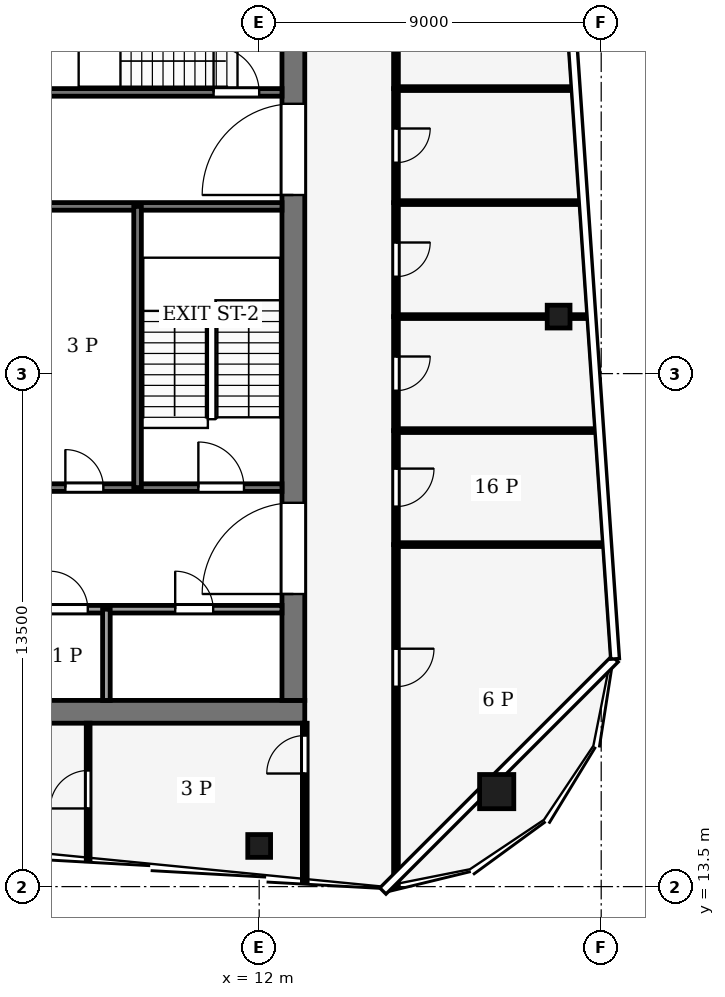
"""IFC4 building model, lengths in metres.
Left out: names, types, materials, properties, quantities, classifications, styles, units other than length and angle.
Written with IfcOpenShell. Run it as: python <this file> out.ifc"""

import sys

from ifc_helpers import new_model, si_unit, direction, frame, frame_2d, origin, origin_2d, place, context, subcontext, project, spatial, rectangle, hollow_rectangle, extrude, element, fill, save


model = new_model("IFC4")
c1 = context("Model", 3, precision=1e-05, world=origin(), true_north=direction((0.0, 1.0)))
c2 = subcontext(c1, "Body", "Model", "MODEL_VIEW")
j1 = project(units=[si_unit("LENGTHUNIT", "METRE"), si_unit("PLANEANGLEUNIT", "RADIAN")], contexts=[c1])
p1 = place(None, origin())
s1 = spatial("IfcSite", under=j1, at=p1, CompositionType="ELEMENT")
p2 = place(p1, origin())
s2 = spatial("IfcBuilding", under=s1, at=p2, CompositionType="ELEMENT")
p3 = place(p2, frame((0.0, 0.0, 314.0)))
s3 = spatial("IfcBuildingStorey", under=s2, at=p3, CompositionType="ELEMENT", Elevation=314.0)
p4 = place(p3, frame((-13.2, 18.1, -0.13), z_axis=(0.0, 0.0, 1.0), x_axis=(1.0, 0.0, 0.0)))
e1 = element("IfcWall", 1, at=p4, inside=s3, PredefinedType="SHEAR", context=c2, shape_type="SweptSolid", body=[
    extrude(rectangle(XDim=26.4, YDim=0.6, at=frame_2d((13.2, 0.0))), origin(), (0.0, 0.0, 1.0), 4.0),
])
p5 = place(p3, frame((12.9, 18.4, -0.13), z_axis=(0.0, 0.0, 1.0), x_axis=(0.0, 1.0, 0.0)))
e2 = element("IfcWall", 2, at=p5, inside=s3, PredefinedType="SHEAR", context=c2, shape_type="SweptSolid", body=[
    extrude(rectangle(XDim=19.2, YDim=0.6, at=frame_2d((9.6, 0.0))), origin(), (0.0, 0.0, 1.0), 4.0),
])
p6 = place(p5, frame((2.8, 0.0, 0.13)))
e3 = element("IfcOpeningElement", 3, at=p6, cuts=e2, PredefinedType="OPENING", context=c2, shape_type="SweptSolid", body=[
    extrude(rectangle(XDim=2.4, YDim=2.4, at=frame_2d((1.2, 1.2))), frame((0.0, 0.31, 0.0), z_axis=(0.0, -1.0, 0.0), x_axis=(1.0, 0.0, 0.0)), (0.0, 0.0, 1.0), 0.62),
])
p7 = place(p5, frame((13.3, 0.0, 0.13)))
e4 = element("IfcOpeningElement", 4, at=p7, cuts=e2, PredefinedType="OPENING", context=c2, shape_type="SweptSolid", body=[
    extrude(rectangle(XDim=2.4, YDim=2.4, at=frame_2d((1.2, 1.2))), frame((0.0, 0.31, 0.0), z_axis=(0.0, -1.0, 0.0), x_axis=(1.0, 0.0, 0.0)), (0.0, 0.0, 1.0), 0.62),
])
p8 = place(p3, frame((18.25, 16.0, 0.0), z_axis=(0.0, 0.0, 1.0), x_axis=(1.0, 0.0, 0.0)))
e5 = element("IfcColumn", 5, at=p8, inside=s3, PredefinedType="COLUMN", context=c2, shape_type="SweptSolid", body=[
    extrude(hollow_rectangle(XDim=0.9, YDim=0.9, WallThickness=0.04, at=origin_2d()), origin(), (0.0, 0.0, 1.0), 4.0),
])
for number, where, z_axis, x_axis in (
    (6, (12.0, 14.57, 0.0), (0.0, 0.0, 1.0), (1.0, 0.0, 0.0)),
    (7, (19.879, 28.5, 0.0), (0.0, 0.0, 1.0), (1.0, 0.0, 0.0)),
):
    element("IfcColumn", number, at=place(p3, frame(where, z_axis=z_axis, x_axis=x_axis)), inside=s3, PredefinedType="COLUMN", context=c2, shape_type="SweptSolid", body=[
        extrude(hollow_rectangle(XDim=0.6, YDim=0.6, WallThickness=0.025, at=origin_2d()), origin(), (0.0, 0.0, 1.0), 4.0),
    ])
p9 = place(p3, frame((6.0, 20.8, 0.0), z_axis=(0.0, 0.0, 1.0), x_axis=(1.0, 0.0, 0.0)))
e8 = element("IfcWall", 8, at=p9, inside=s3, PredefinedType="PARTITIONING", context=c2, shape_type="SweptSolid", body=[
    extrude(rectangle(XDim=6.6, YDim=0.2, at=frame_2d((3.3, 0.0))), origin(), (0.0, 0.0, 1.0), 3.87),
])
p10 = place(p9, frame((0.49, 0.0, 0.0)))
e9 = element("IfcOpeningElement", 9, at=p10, cuts=e8, PredefinedType="OPENING", context=c2, shape_type="SweptSolid", body=[
    extrude(rectangle(XDim=1.0, YDim=2.1, at=frame_2d((0.5, 1.05))), frame((0.0, 0.11, 0.0), z_axis=(0.0, -1.0, 0.0), x_axis=(1.0, 0.0, 0.0)), (0.0, 0.0, 1.0), 0.22),
])
p11 = place(p9, frame((3.79, 0.0, 0.0)))
e10 = element("IfcOpeningElement", 10, at=p11, cuts=e8, PredefinedType="OPENING", context=c2, shape_type="SweptSolid", body=[
    extrude(rectangle(XDim=1.0, YDim=2.1, at=frame_2d((0.5, 1.05))), frame((0.0, 0.11, 0.0), z_axis=(0.0, -1.0, 0.0), x_axis=(1.0, 0.0, 0.0)), (0.0, 0.0, 1.0), 0.22),
])
p12 = place(p3, frame((6.0, 24.0, 0.0), z_axis=(0.0, 0.0, 1.0), x_axis=(1.0, 0.0, 0.0)))
e11 = element("IfcWall", 11, at=p12, inside=s3, PredefinedType="PARTITIONING", context=c2, shape_type="SweptSolid", body=[
    extrude(rectangle(XDim=6.6, YDim=0.2, at=frame_2d((3.3, 0.0))), origin(), (0.0, 0.0, 1.0), 3.87),
])
p13 = place(p12, frame((0.9, 0.0, 0.0)))
e12 = element("IfcOpeningElement", 12, at=p13, cuts=e11, PredefinedType="OPENING", context=c2, shape_type="SweptSolid", body=[
    extrude(rectangle(XDim=1.0, YDim=2.1, at=frame_2d((0.5, 1.05))), frame((0.0, 0.11, 0.0), z_axis=(0.0, -1.0, 0.0), x_axis=(1.0, 0.0, 0.0)), (0.0, 0.0, 1.0), 0.22),
])
p14 = place(p12, frame((4.4, 0.0, 0.0)))
e13 = element("IfcOpeningElement", 13, at=p14, cuts=e11, PredefinedType="OPENING", context=c2, shape_type="SweptSolid", body=[
    extrude(rectangle(XDim=1.2, YDim=2.2, at=frame_2d((0.6, 1.1))), frame((0.0, 0.11, 0.0), z_axis=(0.0, -1.0, 0.0), x_axis=(1.0, 0.0, 0.0)), (0.0, 0.0, 1.0), 0.22),
])
p15 = place(p3, frame((6.0, 31.4, 0.0), z_axis=(0.0, 0.0, 1.0), x_axis=(1.0, 0.0, 0.0)))
e14 = element("IfcWall", 14, at=p15, inside=s3, PredefinedType="PARTITIONING", context=c2, shape_type="SweptSolid", body=[
    extrude(rectangle(XDim=6.6, YDim=0.2, at=frame_2d((3.3, 0.0))), origin(), (0.0, 0.0, 1.0), 3.87),
])
p16 = place(p3, frame((6.0, 34.4, 0.0), z_axis=(0.0, 0.0, 1.0), x_axis=(1.0, 0.0, 0.0)))
e15 = element("IfcWall", 15, at=p16, inside=s3, PredefinedType="PARTITIONING", context=c2, shape_type="SweptSolid", body=[
    extrude(rectangle(XDim=6.6, YDim=0.2, at=frame_2d((3.3, 0.0))), origin(), (0.0, 0.0, 1.0), 3.87),
])
p17 = place(p16, frame((4.8, 0.0, 0.0)))
e16 = element("IfcOpeningElement", 16, at=p17, cuts=e15, PredefinedType="OPENING", context=c2, shape_type="SweptSolid", body=[
    extrude(rectangle(XDim=1.2, YDim=2.2, at=frame_2d((0.6, 1.1))), frame((0.0, 0.11, 0.0), z_axis=(0.0, -1.0, 0.0), x_axis=(1.0, 0.0, 0.0)), (0.0, 0.0, 1.0), 0.22),
])
p18 = place(p3, frame((7.98, 18.4, 0.0), z_axis=(0.0, 0.0, 1.0), x_axis=(0.0, 1.0, 0.0)))
e17 = element("IfcWall", 17, at=p18, inside=s3, PredefinedType="PARTITIONING", context=c2, shape_type="SweptSolid", body=[
    extrude(rectangle(XDim=2.4, YDim=0.2, at=frame_2d((1.2, 0.0))), origin(), (0.0, 0.0, 1.0), 3.87),
])
p19 = place(p3, frame((8.8, 24.0, 0.0), z_axis=(0.0, 0.0, 1.0), x_axis=(0.0, 1.0, 0.0)))
e18 = element("IfcWall", 18, at=p19, inside=s3, PredefinedType="PARTITIONING", context=c2, shape_type="SweptSolid", body=[
    extrude(rectangle(XDim=7.4, YDim=0.2, at=frame_2d((3.7, 0.0))), origin(), (0.0, 0.0, 1.0), 3.87),
])
p20 = place(p3, frame((15.6, 22.5, 0.0), z_axis=(0.0, 0.0, 1.0), x_axis=(0.0, -1.0, 0.0)))
e19 = element("IfcWall", 19, at=p20, inside=s3, PredefinedType="PARTITIONING", context=c2, shape_type="SweptSolid", body=[
    extrude(rectangle(XDim=9.01, YDim=0.125, at=frame_2d((4.505, 0.0))), origin(), (0.0, 0.0, 1.0), 2.93),
])
p21 = place(p20, frame((2.74, 0.0, 0.0)))
e20 = element("IfcOpeningElement", 20, at=p21, cuts=e19, PredefinedType="OPENING", context=c2, shape_type="SweptSolid", body=[
    extrude(rectangle(XDim=1.0, YDim=2.1, at=frame_2d((0.5, 1.05))), frame((0.0, 0.073, 0.0), z_axis=(0.0, -1.0, 0.0), x_axis=(1.0, 0.0, 0.0)), (0.0, 0.0, 1.0), 0.145),
])
p22 = place(p3, frame((15.6, 25.5, 0.0), z_axis=(0.0, 0.0, 1.0), x_axis=(0.0, -1.0, 0.0)))
e21 = element("IfcWall", 21, at=p22, inside=s3, PredefinedType="PARTITIONING", context=c2, shape_type="SweptSolid", body=[
    extrude(rectangle(XDim=3.0, YDim=0.125, at=frame_2d((1.5, 0.0))), origin(), (0.0, 0.0, 1.0), 3.54),
])
p23 = place(p22, frame((1.0, 0.0, 0.0)))
e22 = element("IfcOpeningElement", 22, at=p23, cuts=e21, PredefinedType="OPENING", context=c2, shape_type="SweptSolid", body=[
    extrude(rectangle(XDim=1.0, YDim=2.1, at=frame_2d((0.5, 1.05))), frame((0.0, 0.073, 0.0), z_axis=(0.0, -1.0, 0.0), x_axis=(1.0, 0.0, 0.0)), (0.0, 0.0, 1.0), 0.145),
])
p24 = place(p3, frame((15.6, 28.5, 0.0), z_axis=(0.0, 0.0, 1.0), x_axis=(0.0, -1.0, 0.0)))
e23 = element("IfcWall", 23, at=p24, inside=s3, PredefinedType="PARTITIONING", context=c2, shape_type="SweptSolid", body=[
    extrude(rectangle(XDim=3.0, YDim=0.125, at=frame_2d((1.5, 0.0))), origin(), (0.0, 0.0, 1.0), 3.87),
])
p25 = place(p24, frame((1.05, 0.0, 0.0)))
e24 = element("IfcOpeningElement", 24, at=p25, cuts=e23, PredefinedType="OPENING", context=c2, shape_type="SweptSolid", body=[
    extrude(rectangle(XDim=0.9, YDim=2.1, at=frame_2d((0.45, 1.05))), frame((0.0, 0.073, 0.0), z_axis=(0.0, -1.0, 0.0), x_axis=(1.0, 0.0, 0.0)), (0.0, 0.0, 1.0), 0.145),
])
p26 = place(p3, frame((15.6, 31.5, 0.0), z_axis=(0.0, 0.0, 1.0), x_axis=(0.0, -1.0, 0.0)))
e25 = element("IfcWall", 25, at=p26, inside=s3, PredefinedType="PARTITIONING", context=c2, shape_type="SweptSolid", body=[
    extrude(rectangle(XDim=3.0, YDim=0.125, at=frame_2d((1.5, 0.0))), origin(), (0.0, 0.0, 1.0), 3.87),
])
p27 = place(p26, frame((1.05, 0.0, 0.0)))
e26 = element("IfcOpeningElement", 26, at=p27, cuts=e25, PredefinedType="OPENING", context=c2, shape_type="SweptSolid", body=[
    extrude(rectangle(XDim=0.9, YDim=2.1, at=frame_2d((0.45, 1.05))), frame((0.0, 0.073, 0.0), z_axis=(0.0, -1.0, 0.0), x_axis=(1.0, 0.0, 0.0)), (0.0, 0.0, 1.0), 0.145),
])
p28 = place(p3, frame((15.6, 34.5, 0.0), z_axis=(0.0, 0.0, 1.0), x_axis=(0.0, -1.0, 0.0)))
e27 = element("IfcWall", 27, at=p28, inside=s3, PredefinedType="PARTITIONING", context=c2, shape_type="SweptSolid", body=[
    extrude(rectangle(XDim=3.0, YDim=0.125, at=frame_2d((1.5, 0.0))), origin(), (0.0, 0.0, 1.0), 3.54),
])
p29 = place(p28, frame((1.05, 0.0, 0.0)))
e28 = element("IfcOpeningElement", 28, at=p29, cuts=e27, PredefinedType="OPENING", context=c2, shape_type="SweptSolid", body=[
    extrude(rectangle(XDim=0.9, YDim=2.1, at=frame_2d((0.45, 1.05))), frame((0.0, 0.073, 0.0), z_axis=(0.0, -1.0, 0.0), x_axis=(1.0, 0.0, 0.0)), (0.0, 0.0, 1.0), 0.145),
])
p30 = place(p3, frame((15.6, 40.604, 0.0), z_axis=(0.0, 0.0, 1.0), x_axis=(0.0, -1.0, 0.0)))
e29 = element("IfcWall", 29, at=p30, inside=s3, PredefinedType="PARTITIONING", context=c2, shape_type="SweptSolid", body=[
    extrude(rectangle(XDim=6.104, YDim=0.125, at=frame_2d((3.052, 0.0))), origin(), (0.0, 0.0, 1.0), 3.14),
])
p31 = place(p30, frame((2.552, 0.0, 0.0)))
e30 = element("IfcOpeningElement", 30, at=p31, cuts=e29, PredefinedType="OPENING", context=c2, shape_type="SweptSolid", body=[
    extrude(rectangle(XDim=1.0, YDim=2.1, at=frame_2d((0.5, 1.05))), frame((0.0, 0.073, 0.0), z_axis=(0.0, -1.0, 0.0), x_axis=(1.0, 0.0, 0.0)), (0.0, 0.0, 1.0), 0.145),
])
p32 = place(p3, frame((13.2, 13.622, 0.0), z_axis=(0.0, 0.0, 1.0), x_axis=(0.0, 1.0, 0.0)))
e31 = element("IfcWall", 31, at=p32, inside=s3, PredefinedType="PARTITIONING", context=c2, shape_type="SweptSolid", body=[
    extrude(rectangle(XDim=4.178, YDim=0.125, at=frame_2d((2.089, 0.0))), origin(), (0.0, 0.0, 1.0), 3.04),
])
p33 = place(p32, frame((2.854, 0.0, 0.0)))
e32 = element("IfcOpeningElement", 32, at=p33, cuts=e31, PredefinedType="OPENING", context=c2, shape_type="SweptSolid", body=[
    extrude(rectangle(XDim=1.0, YDim=2.1, at=frame_2d((0.5, 1.05))), frame((0.0, 0.073, 0.0), z_axis=(0.0, -1.0, 0.0), x_axis=(1.0, 0.0, 0.0)), (0.0, 0.0, 1.0), 0.145),
])
p34 = place(p3, frame((21.123, 22.5, 0.0), z_axis=(0.0, 0.0, 1.0), x_axis=(-1.0, 0.0, 0.0)))
e33 = element("IfcWall", 33, at=p34, inside=s3, PredefinedType="PARTITIONING", context=c2, shape_type="SweptSolid", body=[
    extrude(rectangle(XDim=5.523, YDim=0.1, at=frame_2d((2.761, 0.0))), origin(), (0.0, 0.0, 1.0), 3.04),
])
p35 = place(p3, frame((20.916, 25.5, 0.0), z_axis=(0.0, 0.0, 1.0), x_axis=(-1.0, 0.0, 0.0)))
e34 = element("IfcWall", 34, at=p35, inside=s3, PredefinedType="PARTITIONING", context=c2, shape_type="SweptSolid", body=[
    extrude(rectangle(XDim=5.316, YDim=0.1, at=frame_2d((2.658, 0.0))), origin(), (0.0, 0.0, 1.0), 3.04),
])
p36 = place(p3, frame((20.709, 28.5, 0.0), z_axis=(0.0, 0.0, 1.0), x_axis=(-1.0, 0.0, 0.0)))
e35 = element("IfcWall", 35, at=p36, inside=s3, PredefinedType="PARTITIONING", context=c2, shape_type="SweptSolid", body=[
    extrude(rectangle(XDim=5.109, YDim=0.1, at=frame_2d((2.555, 0.0))), origin(), (0.0, 0.0, 1.0), 3.04),
])
p37 = place(p3, frame((20.502, 31.5, 0.0), z_axis=(0.0, 0.0, 1.0), x_axis=(-1.0, 0.0, 0.0)))
e36 = element("IfcWall", 36, at=p37, inside=s3, PredefinedType="PARTITIONING", context=c2, shape_type="SweptSolid", body=[
    extrude(rectangle(XDim=4.902, YDim=0.1, at=frame_2d((2.451, 0.0))), origin(), (0.0, 0.0, 1.0), 3.04),
])
p38 = place(p3, frame((20.295, 34.5, 0.0), z_axis=(0.0, 0.0, 1.0), x_axis=(-1.0, 0.0, 0.0)))
e37 = element("IfcWall", 37, at=p38, inside=s3, PredefinedType="PARTITIONING", context=c2, shape_type="SweptSolid", body=[
    extrude(rectangle(XDim=4.695, YDim=0.1, at=frame_2d((2.348, 0.0))), origin(), (0.0, 0.0, 1.0), 3.04),
])
p39 = place(p3, frame((7.5, 14.182, 0.0), z_axis=(0.0, 0.0, 1.0), x_axis=(0.0, 1.0, 0.0)))
e38 = element("IfcWall", 38, at=p39, inside=s3, PredefinedType="PARTITIONING", context=c2, shape_type="SweptSolid", body=[
    extrude(rectangle(XDim=3.618, YDim=0.1, at=frame_2d((1.809, 0.0))), origin(), (0.0, 0.0, 1.0), 3.04),
])
p40 = place(p39, frame((1.374, 0.0, 0.0)))
e39 = element("IfcOpeningElement", 39, at=p40, cuts=e38, PredefinedType="OPENING", context=c2, shape_type="SweptSolid", body=[
    extrude(rectangle(XDim=1.0, YDim=2.1, at=frame_2d((0.5, 1.05))), frame((0.0, 0.06, 0.0), z_axis=(0.0, -1.0, 0.0), x_axis=(1.0, 0.0, 0.0)), (0.0, 0.0, 1.0), 0.12),
])
p41 = place(p10, origin())
e40 = element("IfcDoor", 40, at=p41, inside=s3, OperationType="SINGLE_SWING_RIGHT", PredefinedType="DOOR", context=c2, shape_type="SweptSolid", body=[
    extrude(rectangle(XDim=1.0, YDim=2.1, at=frame_2d((0.5, 1.05))), frame((0.0, 0.025, 0.0), z_axis=(0.0, -1.0, 0.0), x_axis=(1.0, 0.0, 0.0)), (0.0, 0.0, 1.0), 0.05),
])
fill(e9, e40)
p42 = place(p11, origin())
e41 = element("IfcDoor", 41, at=p42, inside=s3, OperationType="SINGLE_SWING_RIGHT", PredefinedType="DOOR", context=c2, shape_type="SweptSolid", body=[
    extrude(rectangle(XDim=1.0, YDim=2.1, at=frame_2d((0.5, 1.05))), frame((0.0, 0.025, 0.0), z_axis=(0.0, -1.0, 0.0), x_axis=(1.0, 0.0, 0.0)), (0.0, 0.0, 1.0), 0.05),
])
fill(e10, e41)
p43 = place(p13, origin())
e42 = element("IfcDoor", 42, at=p43, inside=s3, OperationType="SINGLE_SWING_RIGHT", PredefinedType="DOOR", context=c2, shape_type="SweptSolid", body=[
    extrude(rectangle(XDim=1.0, YDim=2.1, at=frame_2d((0.5, 1.05))), frame((0.0, 0.025, 0.0), z_axis=(0.0, -1.0, 0.0), x_axis=(1.0, 0.0, 0.0)), (0.0, 0.0, 1.0), 0.05),
])
fill(e12, e42)
p44 = place(p14, origin())
e43 = element("IfcDoor", 43, at=p44, inside=s3, OperationType="SINGLE_SWING_LEFT", PredefinedType="DOOR", context=c2, shape_type="SweptSolid", body=[
    extrude(rectangle(XDim=1.2, YDim=2.2, at=frame_2d((0.6, 1.1))), frame((0.0, 0.025, 0.0), z_axis=(0.0, -1.0, 0.0), x_axis=(1.0, 0.0, 0.0)), (0.0, 0.0, 1.0), 0.05),
])
fill(e13, e43)
p45 = place(p17, origin())
e44 = element("IfcDoor", 44, at=p45, inside=s3, OperationType="SINGLE_SWING_RIGHT", PredefinedType="DOOR", context=c2, shape_type="SweptSolid", body=[
    extrude(rectangle(XDim=1.2, YDim=2.2, at=frame_2d((0.6, 1.1))), frame((0.0, 0.025, 0.0), z_axis=(0.0, -1.0, 0.0), x_axis=(1.0, 0.0, 0.0)), (0.0, 0.0, 1.0), 0.05),
])
fill(e16, e44)
p46 = place(p6, origin())
e45 = element("IfcDoor", 45, at=p46, inside=s3, OperationType="DOUBLE_DOOR_SINGLE_SWING", PredefinedType="DOOR", context=c2, shape_type="SweptSolid", body=[
    extrude(rectangle(XDim=2.4, YDim=2.4, at=frame_2d((1.2, 1.2))), frame((0.0, 0.025, 0.0), z_axis=(0.0, -1.0, 0.0), x_axis=(1.0, 0.0, 0.0)), (0.0, 0.0, 1.0), 0.05),
])
fill(e3, e45)
p47 = place(p7, origin())
e46 = element("IfcDoor", 46, at=p47, inside=s3, OperationType="DOUBLE_DOOR_SINGLE_SWING", PredefinedType="DOOR", context=c2, shape_type="SweptSolid", body=[
    extrude(rectangle(XDim=2.4, YDim=2.4, at=frame_2d((1.2, 1.2))), frame((0.0, 0.025, 0.0), z_axis=(0.0, -1.0, 0.0), x_axis=(1.0, 0.0, 0.0)), (0.0, 0.0, 1.0), 0.05),
])
fill(e4, e46)
p48 = place(p21, origin())
e47 = element("IfcDoor", 47, at=p48, inside=s3, OperationType="SINGLE_SWING_LEFT", PredefinedType="DOOR", context=c2, shape_type="SweptSolid", body=[
    extrude(rectangle(XDim=1.0, YDim=2.1, at=frame_2d((0.5, 1.05))), frame((0.0, 0.025, 0.0), z_axis=(0.0, -1.0, 0.0), x_axis=(1.0, 0.0, 0.0)), (0.0, 0.0, 1.0), 0.05),
])
fill(e20, e47)
p49 = place(p23, origin())
e48 = element("IfcDoor", 48, at=p49, inside=s3, OperationType="SINGLE_SWING_LEFT", PredefinedType="DOOR", context=c2, shape_type="SweptSolid", body=[
    extrude(rectangle(XDim=1.0, YDim=2.1, at=frame_2d((0.5, 1.05))), frame((0.0, 0.025, 0.0), z_axis=(0.0, -1.0, 0.0), x_axis=(1.0, 0.0, 0.0)), (0.0, 0.0, 1.0), 0.05),
])
fill(e22, e48)
p50 = place(p25, origin())
e49 = element("IfcDoor", 49, at=p50, inside=s3, OperationType="SINGLE_SWING_RIGHT", PredefinedType="DOOR", context=c2, shape_type="SweptSolid", body=[
    extrude(rectangle(XDim=0.9, YDim=2.1, at=frame_2d((0.45, 1.05))), frame((0.0, 0.025, 0.0), z_axis=(0.0, -1.0, 0.0), x_axis=(1.0, 0.0, 0.0)), (0.0, 0.0, 1.0), 0.05),
])
fill(e24, e49)
p51 = place(p27, origin())
e50 = element("IfcDoor", 50, at=p51, inside=s3, OperationType="SINGLE_SWING_LEFT", PredefinedType="DOOR", context=c2, shape_type="SweptSolid", body=[
    extrude(rectangle(XDim=0.9, YDim=2.1, at=frame_2d((0.45, 1.05))), frame((0.0, 0.025, 0.0), z_axis=(0.0, -1.0, 0.0), x_axis=(1.0, 0.0, 0.0)), (0.0, 0.0, 1.0), 0.05),
])
fill(e26, e50)
p52 = place(p29, origin())
e51 = element("IfcDoor", 51, at=p52, inside=s3, OperationType="SINGLE_SWING_RIGHT", PredefinedType="DOOR", context=c2, shape_type="SweptSolid", body=[
    extrude(rectangle(XDim=0.9, YDim=2.1, at=frame_2d((0.45, 1.05))), frame((0.0, 0.025, 0.0), z_axis=(0.0, -1.0, 0.0), x_axis=(1.0, 0.0, 0.0)), (0.0, 0.0, 1.0), 0.05),
])
fill(e28, e51)
p53 = place(p33, origin())
e52 = element("IfcDoor", 52, at=p53, inside=s3, OperationType="SINGLE_SWING_RIGHT", PredefinedType="DOOR", context=c2, shape_type="SweptSolid", body=[
    extrude(rectangle(XDim=1.0, YDim=2.1, at=frame_2d((0.5, 1.05))), frame((0.0, 0.025, 0.0), z_axis=(0.0, -1.0, 0.0), x_axis=(1.0, 0.0, 0.0)), (0.0, 0.0, 1.0), 0.05),
])
fill(e32, e52)
p54 = place(p40, origin())
e53 = element("IfcDoor", 53, at=p54, inside=s3, OperationType="SINGLE_SWING_RIGHT", PredefinedType="DOOR", context=c2, shape_type="SweptSolid", body=[
    extrude(rectangle(XDim=1.0, YDim=2.1, at=frame_2d((0.5, 1.05))), frame((0.0, 0.025, 0.0), z_axis=(0.0, -1.0, 0.0), x_axis=(1.0, 0.0, 0.0)), (0.0, 0.0, 1.0), 0.05),
])
fill(e39, e53)
save(model, sys.argv[1])
